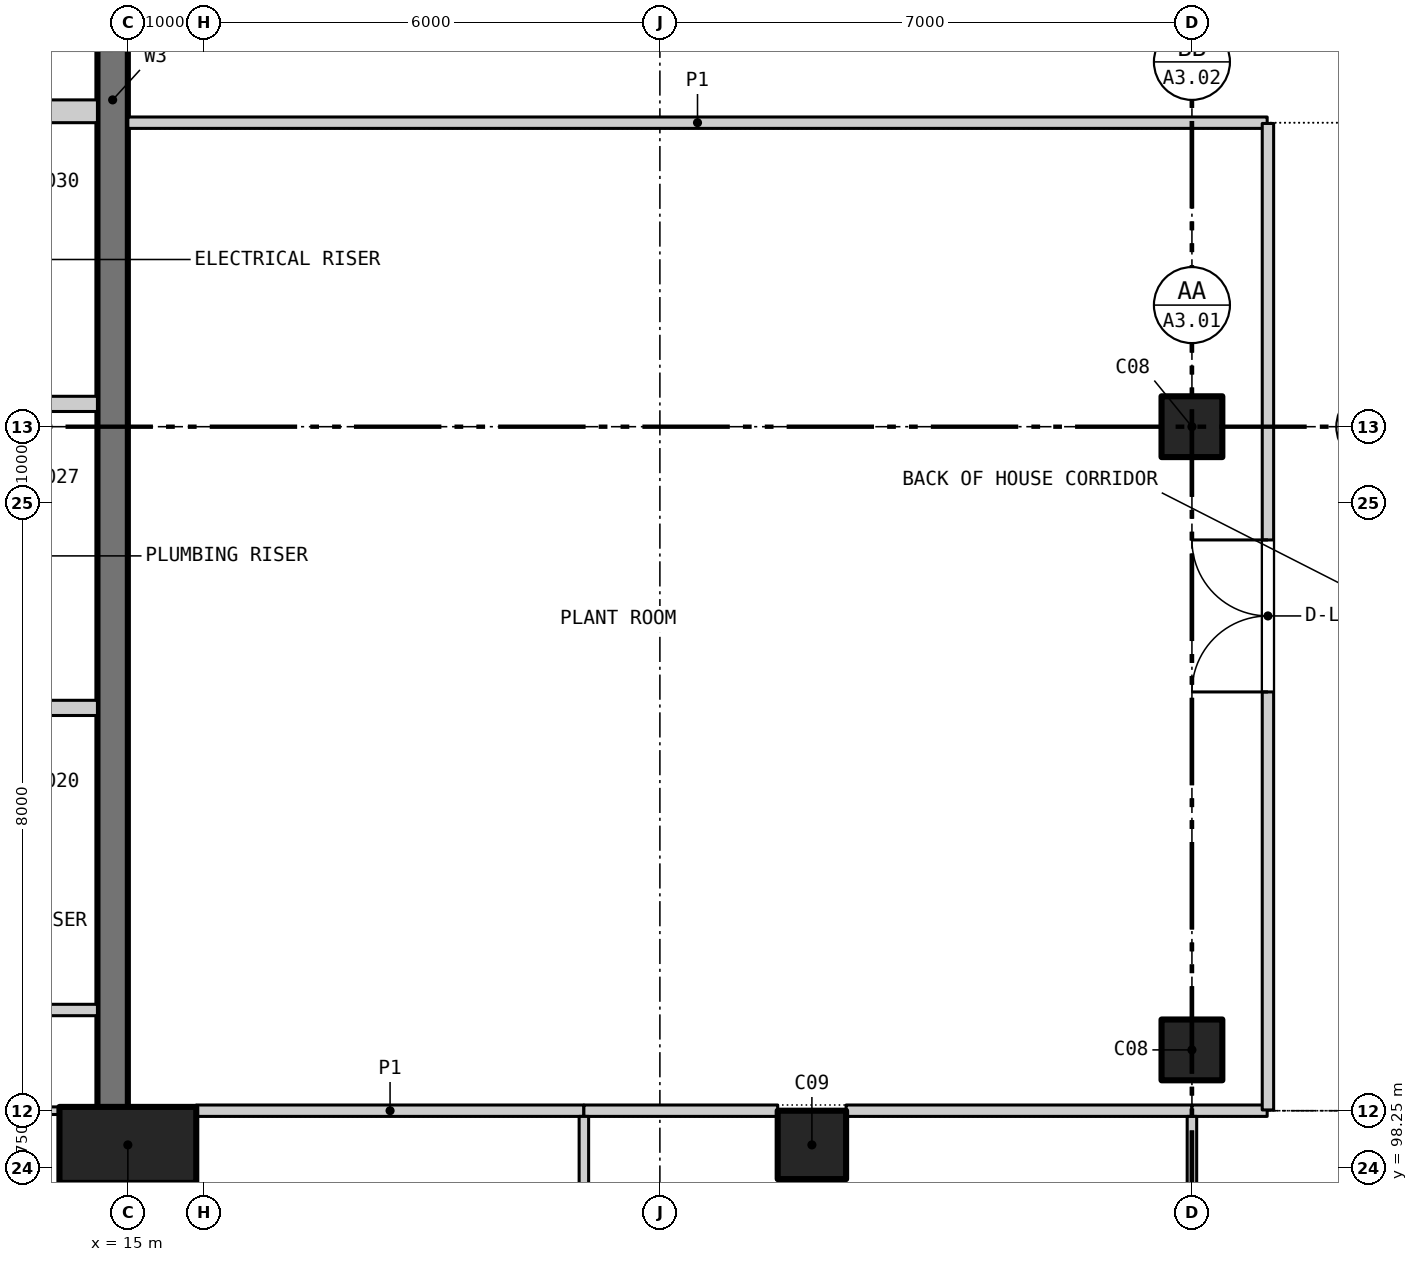
"""IFC4 building model, lengths in metres.
Left out: names, types, materials, properties, quantities, classifications, styles, units other than length and angle.
Written with IfcOpenShell. Run it as: python <this file> out.ifc"""

import sys

from ifc_helpers import new_model, si_unit, direction, frame, frame_2d, origin, origin_2d, place, context, subcontext, project, spatial, rectangle, extrude, element, fill, save


model = new_model("IFC4")
c1 = context("Model", 3, precision=1e-05, world=origin(), true_north=direction((0.0, 1.0)))
c2 = subcontext(c1, "Body", "Model", "MODEL_VIEW")
j1 = project(units=[si_unit("LENGTHUNIT", "METRE"), si_unit("PLANEANGLEUNIT", "RADIAN")], contexts=[c1])
p1 = place(None, origin())
s1 = spatial("IfcSite", under=j1, at=p1, CompositionType="ELEMENT")
p2 = place(p1, origin())
s2 = spatial("IfcBuilding", under=s1, at=p2, CompositionType="ELEMENT")
p3 = place(p2, frame((0.0, 0.0, -5.0)))
s3 = spatial("IfcBuildingStorey", under=s2, at=p3, CompositionType="ELEMENT", Elevation=-5.0)
p4 = place(p3, frame((24.0, 98.55, 0.0), z_axis=(0.0, 0.0, 1.0), x_axis=(1.0, 0.0, 0.0)))
e1 = element("IfcColumn", 1, at=p4, inside=s3, PredefinedType="COLUMN", context=c2, shape_type="SweptSolid", body=[
    extrude(rectangle(XDim=0.9, YDim=0.9, at=origin_2d()), origin(), (0.0, 0.0, 1.0), 4.65),
])
for number, where, z_axis, x_axis in (
    (2, (29.0, 99.8, 0.0), (0.0, 0.0, 1.0), (1.0, 0.0, 0.0)),
    (3, (29.0, 108.0, 0.0), (0.0, 0.0, 1.0), (1.0, 0.0, 0.0)),
):
    element("IfcColumn", number, at=place(p3, frame(where, z_axis=z_axis, x_axis=x_axis)), inside=s3, PredefinedType="COLUMN", context=c2, shape_type="SweptSolid", body=[
        extrude(rectangle(XDim=0.8, YDim=0.8, at=origin_2d()), origin(), (0.0, 0.0, 1.0), 5.0),
    ])
p5 = place(p3, frame((14.8, 99.0, 0.0), z_axis=(0.0, 0.0, 1.0), x_axis=(0.0, 1.0, 0.0)))
e4 = element("IfcWall", 4, at=p5, inside=s3, PredefinedType="SHEAR", context=c2, shape_type="SweptSolid", body=[
    extrude(rectangle(XDim=26.6, YDim=0.4, at=frame_2d((13.3, 0.0))), origin(), (0.0, 0.0, 1.0), 5.0),
])
p6 = place(p5, frame((13.95, 0.0, 0.0)))
e5 = element("IfcOpeningElement", 5, at=p6, cuts=e4, PredefinedType="OPENING", context=c2, shape_type="SweptSolid", body=[
    extrude(rectangle(XDim=1.4, YDim=2.4, at=frame_2d((0.7, 1.2))), frame((0.0, 0.21, 0.0), z_axis=(0.0, -1.0, 0.0), x_axis=(1.0, 0.0, 0.0)), (0.0, 0.0, 1.0), 0.42),
])
p7 = place(p3, frame((15.0, 98.55, 0.0), z_axis=(0.0, 0.0, 1.0), x_axis=(1.0, 0.0, 0.0)))
e6 = element("IfcColumn", 6, at=p7, inside=s3, PredefinedType="COLUMN", context=c2, shape_type="SweptSolid", body=[
    extrude(rectangle(XDim=1.8, YDim=1.0, at=origin_2d()), origin(), (0.0, 0.0, 1.0), 5.0),
])
p8 = place(p3, frame((12.65, 100.325, 0.0), z_axis=(0.0, 0.0, 1.0), x_axis=(1.0, 0.0, 0.0)))
e7 = element("IfcWall", 7, at=p8, inside=s3, PredefinedType="PARTITIONING", context=c2, shape_type="SweptSolid", body=[
    extrude(rectangle(XDim=1.95, YDim=0.15, at=frame_2d((0.975, 0.0))), origin(), (0.0, 0.0, 1.0), 4.7),
])
for number, where, z_axis, x_axis in (
    (8, (12.65, 104.3, 0.0), (0.0, 0.0, 1.0), (1.0, 0.0, 0.0)),
    (9, (12.65, 108.3, 0.0), (0.0, 0.0, 1.0), (1.0, 0.0, 0.0)),
):
    element("IfcWall", number, at=place(p3, frame(where, z_axis=z_axis, x_axis=x_axis)), inside=s3, PredefinedType="PARTITIONING", context=c2, shape_type="SweptSolid", body=[
        extrude(rectangle(XDim=1.95, YDim=0.2, at=frame_2d((0.975, 0.0))), origin(), (0.0, 0.0, 1.0), 4.7),
    ])
p9 = place(p3, frame((12.65, 112.15, 0.0), z_axis=(0.0, 0.0, 1.0), x_axis=(1.0, 0.0, 0.0)))
e10 = element("IfcWall", 10, at=p9, inside=s3, PredefinedType="PARTITIONING", context=c2, shape_type="SweptSolid", body=[
    extrude(rectangle(XDim=1.95, YDim=0.3, at=frame_2d((0.975, 0.0))), origin(), (0.0, 0.0, 1.0), 4.7),
])
p10 = place(p3, frame((12.712, 99.0, 0.0), z_axis=(0.0, 0.0, 1.0), x_axis=(1.0, 0.0, 0.0)))
e11 = element("IfcWall", 11, at=p10, inside=s3, PredefinedType="PARTITIONING", context=c2, shape_type="SweptSolid", body=[
    extrude(rectangle(XDim=1.388, YDim=0.1, at=frame_2d((0.694, 0.0))), origin(), (0.0, 0.0, 1.0), 4.65),
])
p11 = place(p3, frame((15.9, 99.0, 0.0), z_axis=(0.0, 0.0, 1.0), x_axis=(1.0, 0.0, 0.0)))
e12 = element("IfcWall", 12, at=p11, inside=s3, PredefinedType="PARTITIONING", context=c2, shape_type="SweptSolid", body=[
    extrude(rectangle(XDim=5.1, YDim=0.15, at=frame_2d((2.55, 0.0))), origin(), (0.0, 0.0, 1.0), 4.65),
])
p12 = place(p3, frame((21.0, 99.0, 0.0), z_axis=(0.0, 0.0, 1.0), x_axis=(1.0, 0.0, 0.0)))
e13 = element("IfcWall", 13, at=p12, inside=s3, PredefinedType="PARTITIONING", context=c2, shape_type="SweptSolid", body=[
    extrude(rectangle(XDim=2.55, YDim=0.15, at=frame_2d((1.275, 0.0))), origin(), (0.0, 0.0, 1.0), 4.65),
])
p13 = place(p3, frame((24.45, 99.0, 0.0), z_axis=(0.0, 0.0, 1.0), x_axis=(1.0, 0.0, 0.0)))
e14 = element("IfcWall", 14, at=p13, inside=s3, PredefinedType="PARTITIONING", context=c2, shape_type="SweptSolid", body=[
    extrude(rectangle(XDim=4.55, YDim=0.15, at=frame_2d((2.275, 0.0))), origin(), (0.0, 0.0, 1.0), 4.65),
])
p14 = place(p3, frame((29.0, 99.0, 0.0), z_axis=(0.0, 0.0, 1.0), x_axis=(1.0, 0.0, 0.0)))
e15 = element("IfcWall", 15, at=p14, inside=s3, PredefinedType="PARTITIONING", context=c2, shape_type="SweptSolid", body=[
    extrude(rectangle(XDim=0.99, YDim=0.15, at=frame_2d((0.495, 0.0))), origin(), (0.0, 0.0, 1.0), 4.65),
])
p15 = place(p3, frame((15.0, 112.0, 0.0), z_axis=(0.0, 0.0, 1.0), x_axis=(1.0, 0.0, 0.0)))
e16 = element("IfcWall", 16, at=p15, inside=s3, PredefinedType="PARTITIONING", context=c2, shape_type="SweptSolid", body=[
    extrude(rectangle(XDim=14.99, YDim=0.15, at=frame_2d((7.495, 0.0))), origin(), (0.0, 0.0, 1.0), 4.7),
])
p16 = place(p3, frame((21.0, 84.0, 0.0), z_axis=(0.0, 0.0, 1.0), x_axis=(0.0, 1.0, 0.0)))
e17 = element("IfcWall", 17, at=p16, inside=s3, PredefinedType="PARTITIONING", context=c2, shape_type="SweptSolid", body=[
    extrude(rectangle(XDim=14.925, YDim=0.125, at=frame_2d((7.462, 0.0))), origin(), (0.0, 0.0, 1.0), 4.65),
])
p17 = place(p3, frame((29.0, 84.1, 0.0), z_axis=(0.0, 0.0, 1.0), x_axis=(0.0, 1.0, 0.0)))
e18 = element("IfcWall", 18, at=p17, inside=s3, PredefinedType="PARTITIONING", context=c2, shape_type="SweptSolid", body=[
    extrude(rectangle(XDim=14.825, YDim=0.125, at=frame_2d((7.413, 0.0))), origin(), (0.0, 0.0, 1.0), 4.65),
])
p18 = place(p3, frame((30.0, 99.01, 0.0), z_axis=(0.0, 0.0, 1.0), x_axis=(0.0, 1.0, 0.0)))
e19 = element("IfcWall", 19, at=p18, inside=s3, PredefinedType="PARTITIONING", context=c2, shape_type="SweptSolid", body=[
    extrude(rectangle(XDim=12.98, YDim=0.15, at=frame_2d((6.49, 0.0))), origin(), (0.0, 0.0, 1.0), 4.7),
])
p19 = place(p18, frame((5.5, 0.0, 0.0)))
e20 = element("IfcOpeningElement", 20, at=p19, cuts=e19, PredefinedType="OPENING", context=c2, shape_type="SweptSolid", body=[
    extrude(rectangle(XDim=2.0, YDim=2.4, at=frame_2d((1.0, 1.2))), frame((0.0, 0.085, 0.0), z_axis=(0.0, -1.0, 0.0), x_axis=(1.0, 0.0, 0.0)), (0.0, 0.0, 1.0), 0.17),
])
p20 = place(p19, origin())
e21 = element("IfcDoor", 21, at=p20, inside=s3, OperationType="DOUBLE_DOOR_SINGLE_SWING", PredefinedType="DOOR", context=c2, shape_type="SweptSolid", body=[
    extrude(rectangle(XDim=2.0, YDim=2.4, at=frame_2d((1.0, 1.2))), frame((0.0, 0.025, 0.0), z_axis=(0.0, -1.0, 0.0), x_axis=(1.0, 0.0, 0.0)), (0.0, 0.0, 1.0), 0.05),
])
fill(e20, e21)
save(model, sys.argv[1])
